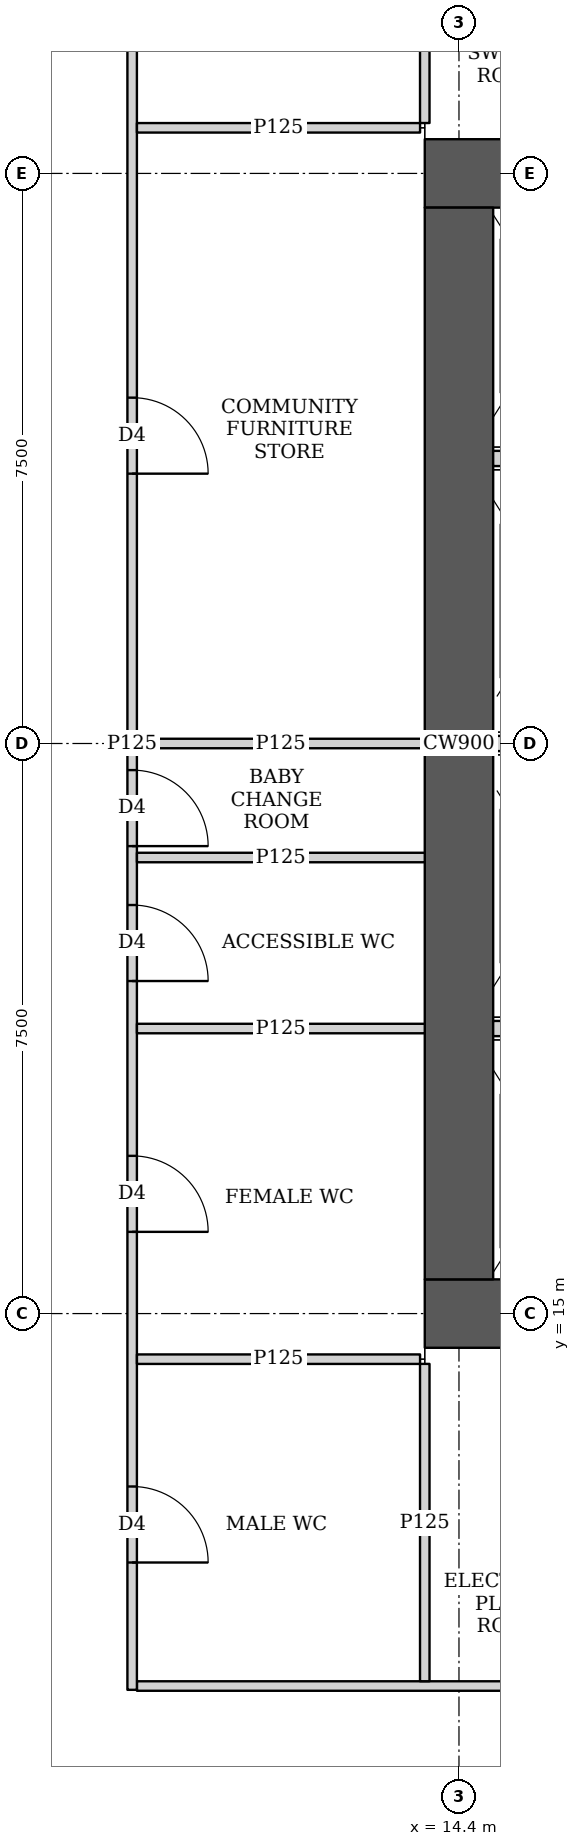
"""IFC4 building model, lengths in metres.
Left out: names, types, materials, properties, quantities, classifications, styles, units other than length and angle.
Written with IfcOpenShell. Run it as: python <this file> out.ifc"""

import sys

from ifc_helpers import new_model, si_unit, direction, frame, frame_2d, origin, place, context, subcontext, project, spatial, rectangle, extrude, element, fill, save


model = new_model("IFC4")
c1 = context("Model", 3, precision=1e-05, world=origin(), true_north=direction((0.0, 1.0)))
c2 = subcontext(c1, "Body", "Model", "MODEL_VIEW")
j1 = project(units=[si_unit("LENGTHUNIT", "METRE"), si_unit("PLANEANGLEUNIT", "RADIAN")], contexts=[c1])
p1 = place(None, origin())
s1 = spatial("IfcSite", under=j1, at=p1, CompositionType="ELEMENT")
p2 = place(p1, origin())
s2 = spatial("IfcBuilding", under=s1, at=p2, CompositionType="ELEMENT")
p3 = place(p2, frame((0.0, 0.0, 72.5)))
s3 = spatial("IfcBuildingStorey", under=s2, at=p3, CompositionType="ELEMENT", Elevation=72.5)
p4 = place(p3, frame((13.95, 15.0, 0.0), z_axis=(0.0, 0.0, 1.0), x_axis=(1.0, 0.0, 0.0)))
e1 = element("IfcWall", 1, at=p4, inside=s3, PredefinedType="SHEAR", context=c2, shape_type="SweptSolid", body=[
    extrude(rectangle(XDim=15.3, YDim=0.9, at=frame_2d((7.65, 0.0))), origin(), (0.0, 0.0, 1.0), 5.4),
])
p5 = place(p4, frame((4.45, 0.0, 0.0)))
e2 = element("IfcOpeningElement", 2, at=p5, cuts=e1, PredefinedType="OPENING", context=c2, shape_type="SweptSolid", body=[
    extrude(rectangle(XDim=1.8, YDim=2.1, at=frame_2d((0.9, 1.05))), frame((0.0, 0.46, 0.0), z_axis=(0.0, -1.0, 0.0), x_axis=(1.0, 0.0, 0.0)), (0.0, 0.0, 1.0), 0.92),
])
p6 = place(p4, frame((10.7, 0.0, 0.0)))
e3 = element("IfcOpeningElement", 3, at=p6, cuts=e1, PredefinedType="OPENING", context=c2, shape_type="SweptSolid", body=[
    extrude(rectangle(XDim=1.1, YDim=2.1, at=frame_2d((0.55, 1.05))), frame((0.0, 0.46, 0.0), z_axis=(0.0, -1.0, 0.0), x_axis=(1.0, 0.0, 0.0)), (0.0, 0.0, 1.0), 0.92),
])
p7 = place(p3, frame((13.95, 30.0, 0.0), z_axis=(0.0, 0.0, 1.0), x_axis=(1.0, 0.0, 0.0)))
e4 = element("IfcWall", 4, at=p7, inside=s3, PredefinedType="SHEAR", context=c2, shape_type="SweptSolid", body=[
    extrude(rectangle(XDim=15.3, YDim=0.9, at=frame_2d((7.65, 0.0))), origin(), (0.0, 0.0, 1.0), 5.4),
])
p8 = place(p7, frame((4.45, 0.0, 0.0)))
e5 = element("IfcOpeningElement", 5, at=p8, cuts=e4, PredefinedType="OPENING", context=c2, shape_type="SweptSolid", body=[
    extrude(rectangle(XDim=1.8, YDim=2.1, at=frame_2d((0.9, 1.05))), frame((0.0, 0.46, 0.0), z_axis=(0.0, -1.0, 0.0), x_axis=(1.0, 0.0, 0.0)), (0.0, 0.0, 1.0), 0.92),
])
p9 = place(p7, frame((10.7, 0.0, 0.0)))
e6 = element("IfcOpeningElement", 6, at=p9, cuts=e4, PredefinedType="OPENING", context=c2, shape_type="SweptSolid", body=[
    extrude(rectangle(XDim=1.1, YDim=2.1, at=frame_2d((0.55, 1.05))), frame((0.0, 0.46, 0.0), z_axis=(0.0, -1.0, 0.0), x_axis=(1.0, 0.0, 0.0)), (0.0, 0.0, 1.0), 0.92),
])
p10 = place(p3, frame((14.4, 15.45, 0.0), z_axis=(0.0, 0.0, 1.0), x_axis=(0.0, 1.0, 0.0)))
e7 = element("IfcWall", 7, at=p10, inside=s3, PredefinedType="SHEAR", context=c2, shape_type="SweptSolid", body=[
    extrude(rectangle(XDim=14.1, YDim=0.9, at=frame_2d((7.05, 0.0))), origin(), (0.0, 0.0, 1.0), 5.4),
])
p11 = place(p3, frame((10.1, 10.05, 0.0), z_axis=(0.0, 0.0, 1.0), x_axis=(0.0, 1.0, 0.0)))
e8 = element("IfcWall", 8, at=p11, inside=s3, PredefinedType="PARTITIONING", context=c2, shape_type="SweptSolid", body=[
    extrude(rectangle(XDim=24.9, YDim=0.125, at=frame_2d((12.45, 0.0))), origin(), (0.0, 0.0, 1.0), 3.55),
])
p12 = place(p11, frame((1.675, 0.0, 0.0)))
e9 = element("IfcOpeningElement", 9, at=p12, cuts=e8, PredefinedType="OPENING", context=c2, shape_type="SweptSolid", body=[
    extrude(rectangle(XDim=1.0, YDim=2.1, at=frame_2d((0.5, 1.05))), frame((0.0, 0.073, 0.0), z_axis=(0.0, -1.0, 0.0), x_axis=(1.0, 0.0, 0.0)), (0.0, 0.0, 1.0), 0.145),
])
p13 = place(p11, frame((16.0, 0.0, 0.0)))
e10 = element("IfcOpeningElement", 10, at=p13, cuts=e8, PredefinedType="OPENING", context=c2, shape_type="SweptSolid", body=[
    extrude(rectangle(XDim=1.0, YDim=2.1, at=frame_2d((0.5, 1.05))), frame((0.0, 0.073, 0.0), z_axis=(0.0, -1.0, 0.0), x_axis=(1.0, 0.0, 0.0)), (0.0, 0.0, 1.0), 0.145),
])
p14 = place(p11, frame((22.225, 0.0, 0.0)))
e11 = element("IfcOpeningElement", 11, at=p14, cuts=e8, PredefinedType="OPENING", context=c2, shape_type="SweptSolid", body=[
    extrude(rectangle(XDim=1.0, YDim=2.1, at=frame_2d((0.5, 1.05))), frame((0.0, 0.073, 0.0), z_axis=(0.0, -1.0, 0.0), x_axis=(1.0, 0.0, 0.0)), (0.0, 0.0, 1.0), 0.145),
])
p15 = place(p11, frame((6.025, 0.0, 0.0)))
e12 = element("IfcOpeningElement", 12, at=p15, cuts=e8, PredefinedType="OPENING", context=c2, shape_type="SweptSolid", body=[
    extrude(rectangle(XDim=1.0, YDim=2.1, at=frame_2d((0.5, 1.05))), frame((0.0, 0.073, 0.0), z_axis=(0.0, -1.0, 0.0), x_axis=(1.0, 0.0, 0.0)), (0.0, 0.0, 1.0), 0.145),
])
p16 = place(p11, frame((9.325, 0.0, 0.0)))
e13 = element("IfcOpeningElement", 13, at=p16, cuts=e8, PredefinedType="OPENING", context=c2, shape_type="SweptSolid", body=[
    extrude(rectangle(XDim=1.0, YDim=2.1, at=frame_2d((0.5, 1.05))), frame((0.0, 0.073, 0.0), z_axis=(0.0, -1.0, 0.0), x_axis=(1.0, 0.0, 0.0)), (0.0, 0.0, 1.0), 0.145),
])
p17 = place(p11, frame((11.1, 0.0, 0.0)))
e14 = element("IfcOpeningElement", 14, at=p17, cuts=e8, PredefinedType="OPENING", context=c2, shape_type="SweptSolid", body=[
    extrude(rectangle(XDim=1.0, YDim=2.1, at=frame_2d((0.5, 1.05))), frame((0.0, 0.073, 0.0), z_axis=(0.0, -1.0, 0.0), x_axis=(1.0, 0.0, 0.0)), (0.0, 0.0, 1.0), 0.145),
])
p18 = place(p3, frame((10.163, 14.4, 0.0), z_axis=(0.0, 0.0, 1.0), x_axis=(1.0, 0.0, 0.0)))
e15 = element("IfcWall", 15, at=p18, inside=s3, PredefinedType="PARTITIONING", context=c2, shape_type="SweptSolid", body=[
    extrude(rectangle(XDim=3.725, YDim=0.125, at=frame_2d((1.862, 0.0))), origin(), (0.0, 0.0, 1.0), 3.55),
])
p19 = place(p3, frame((10.163, 22.5, 0.0), z_axis=(0.0, 0.0, 1.0), x_axis=(1.0, 0.0, 0.0)))
e16 = element("IfcWall", 16, at=p19, inside=s3, PredefinedType="PARTITIONING", context=c2, shape_type="SweptSolid", body=[
    extrude(rectangle(XDim=3.787, YDim=0.125, at=frame_2d((1.894, 0.0))), origin(), (0.0, 0.0, 1.0), 3.55),
])
p20 = place(p3, frame((10.163, 30.6, 0.0), z_axis=(0.0, 0.0, 1.0), x_axis=(1.0, 0.0, 0.0)))
e17 = element("IfcWall", 17, at=p20, inside=s3, PredefinedType="PARTITIONING", context=c2, shape_type="SweptSolid", body=[
    extrude(rectangle(XDim=3.725, YDim=0.125, at=frame_2d((1.862, 0.0))), origin(), (0.0, 0.0, 1.0), 3.55),
])
p21 = place(p3, frame((13.95, 10.163, 0.0), z_axis=(0.0, 0.0, 1.0), x_axis=(0.0, 1.0, 0.0)))
e18 = element("IfcWall", 18, at=p21, inside=s3, PredefinedType="PARTITIONING", context=c2, shape_type="SweptSolid", body=[
    extrude(rectangle(XDim=4.175, YDim=0.125, at=frame_2d((2.087, 0.0))), origin(), (0.0, 0.0, 1.0), 3.55),
])
p22 = place(p3, frame((13.95, 30.663, 0.0), z_axis=(0.0, 0.0, 1.0), x_axis=(0.0, 1.0, 0.0)))
e19 = element("IfcWall", 19, at=p22, inside=s3, PredefinedType="PARTITIONING", context=c2, shape_type="SweptSolid", body=[
    extrude(rectangle(XDim=4.174, YDim=0.125, at=frame_2d((2.087, 0.0))), origin(), (0.0, 0.0, 1.0), 3.55),
])
p23 = place(p3, frame((10.163, 10.1, 0.0), z_axis=(0.0, 0.0, 1.0), x_axis=(1.0, 0.0, 0.0)))
e20 = element("IfcWall", 20, at=p23, inside=s3, PredefinedType="PARTITIONING", context=c2, shape_type="SweptSolid", body=[
    extrude(rectangle(XDim=11.287, YDim=0.125, at=frame_2d((5.644, 0.0))), origin(), (0.0, 0.0, 1.0), 3.15),
])
p24 = place(p23, frame((7.832, 0.0, 0.0)))
e21 = element("IfcOpeningElement", 21, at=p24, cuts=e20, PredefinedType="OPENING", context=c2, shape_type="SweptSolid", body=[
    extrude(rectangle(XDim=1.8, YDim=2.1, at=frame_2d((0.9, 1.05))), frame((0.0, 0.073, 0.0), z_axis=(0.0, -1.0, 0.0), x_axis=(1.0, 0.0, 0.0)), (0.0, 0.0, 1.0), 0.145),
])
for number, where, z_axis, x_axis in (
    (22, (10.163, 18.75, 0.0), (0.0, 0.0, 1.0), (1.0, 0.0, 0.0)),
    (23, (10.163, 21.0, 0.0), (0.0, 0.0, 1.0), (1.0, 0.0, 0.0)),
):
    element("IfcWall", number, at=place(p3, frame(where, z_axis=z_axis, x_axis=x_axis)), inside=s3, PredefinedType="PARTITIONING", context=c2, shape_type="SweptSolid", body=[
        extrude(rectangle(XDim=3.787, YDim=0.125, at=frame_2d((1.894, 0.0))), origin(), (0.0, 0.0, 1.0), 5.15),
    ])
for number, where, z_axis, x_axis in (
    (24, (14.85, 18.75, 0.0), (0.0, 0.0, 1.0), (1.0, 0.0, 0.0)),
    (25, (14.85, 22.5, 0.0), (0.0, 0.0, 1.0), (1.0, 0.0, 0.0)),
    (26, (14.85, 26.25, 0.0), (0.0, 0.0, 1.0), (1.0, 0.0, 0.0)),
):
    element("IfcWall", number, at=place(p3, frame(where, z_axis=z_axis, x_axis=x_axis)), inside=s3, PredefinedType="SOLIDWALL", context=c2, shape_type="SweptSolid", body=[
        extrude(rectangle(XDim=1.95, YDim=0.2, at=frame_2d((0.975, 0.0))), origin(), (0.0, 0.0, 1.0), 5.15),
    ])
p25 = place(p12, origin())
e27 = element("IfcDoor", 27, at=p25, inside=s3, OperationType="SINGLE_SWING_RIGHT", PredefinedType="DOOR", context=c2, shape_type="SweptSolid", body=[
    extrude(rectangle(XDim=1.0, YDim=2.1, at=frame_2d((0.5, 1.05))), frame((0.0, 0.025, 0.0), z_axis=(0.0, -1.0, 0.0), x_axis=(1.0, 0.0, 0.0)), (0.0, 0.0, 1.0), 0.05),
])
fill(e9, e27)
p26 = place(p13, origin())
e28 = element("IfcDoor", 28, at=p26, inside=s3, OperationType="SINGLE_SWING_RIGHT", PredefinedType="DOOR", context=c2, shape_type="SweptSolid", body=[
    extrude(rectangle(XDim=1.0, YDim=2.1, at=frame_2d((0.5, 1.05))), frame((0.0, 0.025, 0.0), z_axis=(0.0, -1.0, 0.0), x_axis=(1.0, 0.0, 0.0)), (0.0, 0.0, 1.0), 0.05),
])
fill(e10, e28)
p27 = place(p15, origin())
e29 = element("IfcDoor", 29, at=p27, inside=s3, OperationType="SINGLE_SWING_RIGHT", PredefinedType="DOOR", context=c2, shape_type="SweptSolid", body=[
    extrude(rectangle(XDim=1.0, YDim=2.1, at=frame_2d((0.5, 1.05))), frame((0.0, 0.025, 0.0), z_axis=(0.0, -1.0, 0.0), x_axis=(1.0, 0.0, 0.0)), (0.0, 0.0, 1.0), 0.05),
])
fill(e12, e29)
p28 = place(p16, origin())
e30 = element("IfcDoor", 30, at=p28, inside=s3, OperationType="SINGLE_SWING_RIGHT", PredefinedType="DOOR", context=c2, shape_type="SweptSolid", body=[
    extrude(rectangle(XDim=1.0, YDim=2.1, at=frame_2d((0.5, 1.05))), frame((0.0, 0.025, 0.0), z_axis=(0.0, -1.0, 0.0), x_axis=(1.0, 0.0, 0.0)), (0.0, 0.0, 1.0), 0.05),
])
fill(e13, e30)
p29 = place(p17, origin())
e31 = element("IfcDoor", 31, at=p29, inside=s3, OperationType="SINGLE_SWING_RIGHT", PredefinedType="DOOR", context=c2, shape_type="SweptSolid", body=[
    extrude(rectangle(XDim=1.0, YDim=2.1, at=frame_2d((0.5, 1.05))), frame((0.0, 0.025, 0.0), z_axis=(0.0, -1.0, 0.0), x_axis=(1.0, 0.0, 0.0)), (0.0, 0.0, 1.0), 0.05),
])
fill(e14, e31)
save(model, sys.argv[1])
